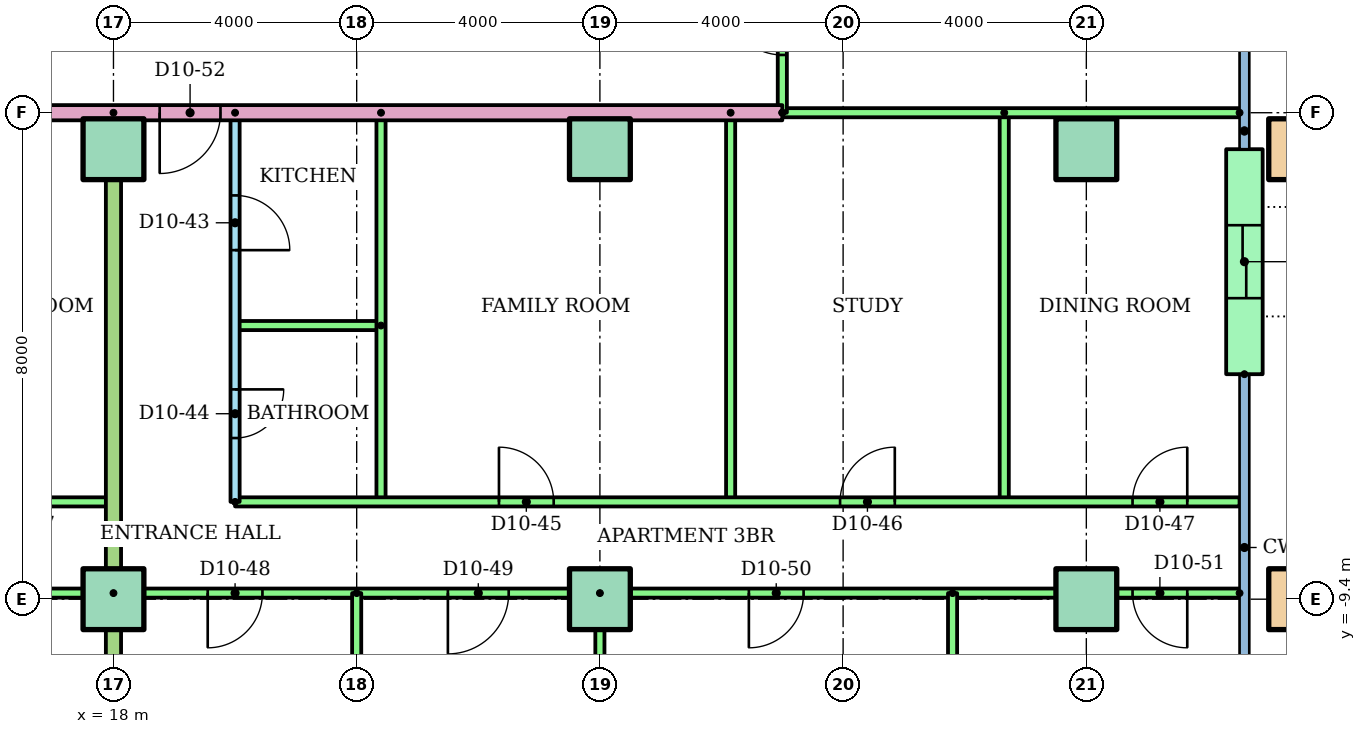
"""IFC4 building model, lengths in metres.
Left out: names, types, materials, properties, quantities, classifications, styles, units other than length and angle.
Written with IfcOpenShell. Run it as: python <this file> out.ifc"""

import sys

from ifc_helpers import new_model, si_unit, direction, frame, frame_2d, origin, origin_2d, place, context, subcontext, project, spatial, rectangle, hollow_rectangle, extrude, element, fill, save


model = new_model("IFC4")
c1 = context("Model", 3, precision=1e-05, world=origin(), true_north=direction((0.0, 1.0)))
c2 = subcontext(c1, "Body", "Model", "MODEL_VIEW")
j1 = project(units=[si_unit("LENGTHUNIT", "METRE"), si_unit("PLANEANGLEUNIT", "RADIAN")], contexts=[c1])
p1 = place(None, origin())
s1 = spatial("IfcSite", under=j1, at=p1, CompositionType="ELEMENT")
p2 = place(p1, origin())
s2 = spatial("IfcBuilding", under=s1, at=p2, CompositionType="ELEMENT")
p3 = place(p2, frame((0.0, 0.0, 41.6)))
s3 = spatial("IfcBuildingStorey", under=s2, at=p3, CompositionType="ELEMENT", Elevation=41.6)
for number, where in (
    (1, (18.0, -9.4, 0.0)),
    (2, (26.0, -9.4, 0.0)),
    (3, (34.0, -9.4, 0.0)),
):
    element("IfcColumn", number, at=place(p3, frame(where)), inside=s3, PredefinedType="COLUMN", context=c2, shape_type="SweptSolid", body=[
        extrude(rectangle(XDim=1.0, YDim=1.0, at=origin_2d()), origin(), (0.0, 0.0, 1.0), 3.2),
    ])
p4 = place(p3, frame((37.5, -9.4, 0.0)))
e4 = element("IfcColumn", 4, at=p4, inside=s3, PredefinedType="COLUMN", context=c2, shape_type="SweptSolid", body=[
    extrude(hollow_rectangle(XDim=1.0, YDim=1.0, WallThickness=0.05, at=origin_2d()), origin(), (0.0, 0.0, 1.0), 3.2),
])
for number, where in (
    (5, (18.0, -2.0, 0.0)),
    (6, (26.0, -2.0, 0.0)),
    (7, (34.0, -2.0, 0.0)),
):
    element("IfcColumn", number, at=place(p3, frame(where)), inside=s3, PredefinedType="COLUMN", context=c2, shape_type="SweptSolid", body=[
        extrude(rectangle(XDim=1.0, YDim=1.0, at=origin_2d()), origin(), (0.0, 0.0, 1.0), 3.2),
    ])
p5 = place(p3, frame((37.5, -2.0, 0.0)))
e8 = element("IfcColumn", 8, at=p5, inside=s3, PredefinedType="COLUMN", context=c2, shape_type="SweptSolid", body=[
    extrude(hollow_rectangle(XDim=1.0, YDim=1.0, WallThickness=0.05, at=origin_2d()), origin(), (0.0, 0.0, 1.0), 3.2),
])
p6 = place(p3, frame((36.6, -5.7, 0.0), z_axis=(0.0, 0.0, 1.0), x_axis=(0.0, 1.0, 0.0)))
e9 = element("IfcWall", 9, at=p6, inside=s3, PredefinedType="STANDARD", context=c2, shape_type="SweptSolid", body=[
    extrude(rectangle(XDim=3.7, YDim=0.6, at=frame_2d((1.85, 0.0))), origin(), (0.0, 0.0, 1.0), 2.92),
])
p7 = place(p6, frame((1.25, 0.0, 0.0)))
e10 = element("IfcOpeningElement", 10, at=p7, cuts=e9, PredefinedType="OPENING", context=c2, shape_type="SweptSolid", body=[
    extrude(rectangle(XDim=1.2, YDim=2.1, at=frame_2d((0.6, 1.05))), frame((0.0, 0.31, 0.0), z_axis=(0.0, -1.0, 0.0), x_axis=(1.0, 0.0, 0.0)), (0.0, 0.0, 1.0), 0.62),
])
p8 = place(p3, frame((4.0, -7.8, 0.0)))
e11 = element("IfcWall", 11, at=p8, inside=s3, PredefinedType="PARTITIONING", context=c2, shape_type="SweptSolid", body=[
    extrude(rectangle(XDim=14.0, YDim=0.15, at=frame_2d((7.0, 0.0))), origin(), (0.0, 0.0, 1.0), 2.4),
])
p9 = place(p8, frame((4.325, 0.0, 0.0)))
e12 = element("IfcOpeningElement", 12, at=p9, cuts=e11, PredefinedType="OPENING", context=c2, shape_type="SweptSolid", body=[
    extrude(rectangle(XDim=0.9, YDim=2.1, at=frame_2d((0.45, 1.05))), frame((0.0, 0.085, 0.0), z_axis=(0.0, -1.0, 0.0), x_axis=(1.0, 0.0, 0.0)), (0.0, 0.0, 1.0), 0.17),
])
p10 = place(p8, frame((8.575, 0.0, 0.0)))
e13 = element("IfcOpeningElement", 13, at=p10, cuts=e11, PredefinedType="OPENING", context=c2, shape_type="SweptSolid", body=[
    extrude(rectangle(XDim=0.9, YDim=2.1, at=frame_2d((0.45, 1.05))), frame((0.0, 0.085, 0.0), z_axis=(0.0, -1.0, 0.0), x_axis=(1.0, 0.0, 0.0)), (0.0, 0.0, 1.0), 0.17),
])
p11 = place(p8, frame((12.0, 0.0, 0.0)))
e14 = element("IfcOpeningElement", 14, at=p11, cuts=e11, PredefinedType="OPENING", context=c2, shape_type="SweptSolid", body=[
    extrude(rectangle(XDim=0.9, YDim=2.1, at=frame_2d((0.45, 1.05))), frame((0.0, 0.085, 0.0), z_axis=(0.0, -1.0, 0.0), x_axis=(1.0, 0.0, 0.0)), (0.0, 0.0, 1.0), 0.17),
])
p12 = place(p3, frame((18.0, -9.3, 0.0), z_axis=(0.0, 0.0, 1.0), x_axis=(-1.0, 0.0, 0.0)))
e15 = element("IfcWall", 15, at=p12, inside=s3, PredefinedType="PARTITIONING", context=c2, shape_type="SweptSolid", body=[
    extrude(rectangle(XDim=16.0, YDim=0.15, at=frame_2d((8.0, 0.0))), origin(), (0.0, 0.0, 1.0), 2.4),
])
p13 = place(p12, frame((13.55, 0.0, 0.0)))
e16 = element("IfcOpeningElement", 16, at=p13, cuts=e15, PredefinedType="OPENING", context=c2, shape_type="SweptSolid", body=[
    extrude(rectangle(XDim=0.9, YDim=2.1, at=frame_2d((0.45, 1.05))), frame((0.0, 0.085, 0.0), z_axis=(0.0, -1.0, 0.0), x_axis=(1.0, 0.0, 0.0)), (0.0, 0.0, 1.0), 0.17),
])
p14 = place(p12, frame((9.55, 0.0, 0.0)))
e17 = element("IfcOpeningElement", 17, at=p14, cuts=e15, PredefinedType="OPENING", context=c2, shape_type="SweptSolid", body=[
    extrude(rectangle(XDim=0.9, YDim=2.1, at=frame_2d((0.45, 1.05))), frame((0.0, 0.085, 0.0), z_axis=(0.0, -1.0, 0.0), x_axis=(1.0, 0.0, 0.0)), (0.0, 0.0, 1.0), 0.17),
])
p15 = place(p12, frame((5.55, 0.0, 0.0)))
e18 = element("IfcOpeningElement", 18, at=p15, cuts=e15, PredefinedType="OPENING", context=c2, shape_type="SweptSolid", body=[
    extrude(rectangle(XDim=0.9, YDim=2.1, at=frame_2d((0.45, 1.05))), frame((0.0, 0.085, 0.0), z_axis=(0.0, -1.0, 0.0), x_axis=(1.0, 0.0, 0.0)), (0.0, 0.0, 1.0), 0.17),
])
p16 = place(p12, frame((1.5, 0.0, 0.0)))
e19 = element("IfcOpeningElement", 19, at=p16, cuts=e15, PredefinedType="OPENING", context=c2, shape_type="SweptSolid", body=[
    extrude(rectangle(XDim=1.0, YDim=2.1, at=frame_2d((0.5, 1.05))), frame((0.0, 0.085, 0.0), z_axis=(0.0, -1.0, 0.0), x_axis=(1.0, 0.0, 0.0)), (0.0, 0.0, 1.0), 0.17),
])
p17 = place(p3, frame((20.0, -1.4, 0.0), z_axis=(0.0, 0.0, 1.0), x_axis=(0.0, -1.0, 0.0)))
e20 = element("IfcWall", 20, at=p17, inside=s3, PredefinedType="PARTITIONING", context=c2, shape_type="SweptSolid", body=[
    extrude(rectangle(XDim=6.4, YDim=0.15, at=frame_2d((3.2, 0.0))), origin(), (0.0, 0.0, 1.0), 2.4),
])
p18 = place(p17, frame((1.36, 0.0, 0.0)))
e21 = element("IfcOpeningElement", 21, at=p18, cuts=e20, PredefinedType="OPENING", context=c2, shape_type="SweptSolid", body=[
    extrude(rectangle(XDim=0.9, YDim=2.1, at=frame_2d((0.45, 1.05))), frame((0.0, 0.085, 0.0), z_axis=(0.0, -1.0, 0.0), x_axis=(1.0, 0.0, 0.0)), (0.0, 0.0, 1.0), 0.17),
])
p19 = place(p17, frame((4.55, 0.0, 0.0)))
e22 = element("IfcOpeningElement", 22, at=p19, cuts=e20, PredefinedType="OPENING", context=c2, shape_type="SweptSolid", body=[
    extrude(rectangle(XDim=0.8, YDim=2.1, at=frame_2d((0.4, 1.05))), frame((0.0, 0.085, 0.0), z_axis=(0.0, -1.0, 0.0), x_axis=(1.0, 0.0, 0.0)), (0.0, 0.0, 1.0), 0.17),
])
p20 = place(p3, frame((22.4, -4.9, 0.0), z_axis=(0.0, 0.0, 1.0), x_axis=(-1.0, 0.0, 0.0)))
e23 = element("IfcWall", 23, at=p20, inside=s3, PredefinedType="PARTITIONING", context=c2, shape_type="SweptSolid", body=[
    extrude(rectangle(XDim=2.4, YDim=0.15, at=frame_2d((1.2, 0.0))), origin(), (0.0, 0.0, 1.0), 2.4),
])
for number, where, z_axis, x_axis in (
    (24, (22.4, -1.4, 0.0), (0.0, 0.0, 1.0), (0.0, -1.0, 0.0)),
    (25, (28.15, -1.4, 0.0), (0.0, 0.0, 1.0), (0.0, -1.0, 0.0)),
    (26, (32.65, -1.4, 0.0), (0.0, 0.0, 1.0), (0.0, -1.0, 0.0)),
):
    element("IfcWall", number, at=place(p3, frame(where, z_axis=z_axis, x_axis=x_axis)), inside=s3, PredefinedType="PARTITIONING", context=c2, shape_type="SweptSolid", body=[
        extrude(rectangle(XDim=6.4, YDim=0.15, at=frame_2d((3.2, 0.0))), origin(), (0.0, 0.0, 1.0), 2.4),
    ])
p21 = place(p3, frame((20.0, -7.8, 0.0)))
e27 = element("IfcWall", 27, at=p21, inside=s3, PredefinedType="PARTITIONING", context=c2, shape_type="SweptSolid", body=[
    extrude(rectangle(XDim=16.52, YDim=0.15, at=frame_2d((8.26, 0.0))), origin(), (0.0, 0.0, 1.0), 2.4),
])
p22 = place(p21, frame((4.34, 0.0, 0.0)))
e28 = element("IfcOpeningElement", 28, at=p22, cuts=e27, PredefinedType="OPENING", context=c2, shape_type="SweptSolid", body=[
    extrude(rectangle(XDim=0.9, YDim=2.1, at=frame_2d((0.45, 1.05))), frame((0.0, 0.085, 0.0), z_axis=(0.0, -1.0, 0.0), x_axis=(1.0, 0.0, 0.0)), (0.0, 0.0, 1.0), 0.17),
])
p23 = place(p21, frame((9.95, 0.0, 0.0)))
e29 = element("IfcOpeningElement", 29, at=p23, cuts=e27, PredefinedType="OPENING", context=c2, shape_type="SweptSolid", body=[
    extrude(rectangle(XDim=0.9, YDim=2.1, at=frame_2d((0.45, 1.05))), frame((0.0, 0.085, 0.0), z_axis=(0.0, -1.0, 0.0), x_axis=(1.0, 0.0, 0.0)), (0.0, 0.0, 1.0), 0.17),
])
p24 = place(p21, frame((14.76, 0.0, 0.0)))
e30 = element("IfcOpeningElement", 30, at=p24, cuts=e27, PredefinedType="OPENING", context=c2, shape_type="SweptSolid", body=[
    extrude(rectangle(XDim=0.9, YDim=2.1, at=frame_2d((0.45, 1.05))), frame((0.0, 0.085, 0.0), z_axis=(0.0, -1.0, 0.0), x_axis=(1.0, 0.0, 0.0)), (0.0, 0.0, 1.0), 0.17),
])
p25 = place(p3, frame((36.52, -9.3, 0.0), z_axis=(0.0, 0.0, 1.0), x_axis=(-1.0, 0.0, 0.0)))
e31 = element("IfcWall", 31, at=p25, inside=s3, PredefinedType="PARTITIONING", context=c2, shape_type="SweptSolid", body=[
    extrude(rectangle(XDim=18.52, YDim=0.15, at=frame_2d((9.26, 0.0))), origin(), (0.0, 0.0, 1.0), 2.4),
])
p26 = place(p25, frame((16.07, 0.0, 0.0)))
e32 = element("IfcOpeningElement", 32, at=p26, cuts=e31, PredefinedType="OPENING", context=c2, shape_type="SweptSolid", body=[
    extrude(rectangle(XDim=0.9, YDim=2.1, at=frame_2d((0.45, 1.05))), frame((0.0, 0.085, 0.0), z_axis=(0.0, -1.0, 0.0), x_axis=(1.0, 0.0, 0.0)), (0.0, 0.0, 1.0), 0.17),
])
p27 = place(p25, frame((12.02, 0.0, 0.0)))
e33 = element("IfcOpeningElement", 33, at=p27, cuts=e31, PredefinedType="OPENING", context=c2, shape_type="SweptSolid", body=[
    extrude(rectangle(XDim=1.0, YDim=2.1, at=frame_2d((0.5, 1.05))), frame((0.0, 0.085, 0.0), z_axis=(0.0, -1.0, 0.0), x_axis=(1.0, 0.0, 0.0)), (0.0, 0.0, 1.0), 0.17),
])
p28 = place(p25, frame((7.17, 0.0, 0.0)))
e34 = element("IfcOpeningElement", 34, at=p28, cuts=e31, PredefinedType="OPENING", context=c2, shape_type="SweptSolid", body=[
    extrude(rectangle(XDim=0.9, YDim=2.1, at=frame_2d((0.45, 1.05))), frame((0.0, 0.085, 0.0), z_axis=(0.0, -1.0, 0.0), x_axis=(1.0, 0.0, 0.0)), (0.0, 0.0, 1.0), 0.17),
])
p29 = place(p25, frame((0.86, 0.0, 0.0)))
e35 = element("IfcOpeningElement", 35, at=p29, cuts=e31, PredefinedType="OPENING", context=c2, shape_type="SweptSolid", body=[
    extrude(rectangle(XDim=0.9, YDim=2.1, at=frame_2d((0.45, 1.05))), frame((0.0, 0.085, 0.0), z_axis=(0.0, -1.0, 0.0), x_axis=(1.0, 0.0, 0.0)), (0.0, 0.0, 1.0), 0.17),
])
p30 = place(p3, frame((22.0, -9.3, 0.0), z_axis=(0.0, 0.0, 1.0), x_axis=(0.0, -1.0, 0.0)))
e36 = element("IfcWall", 36, at=p30, inside=s3, PredefinedType="PARTITIONING", context=c2, shape_type="SweptSolid", body=[
    extrude(rectangle(XDim=6.821, YDim=0.15, at=frame_2d((3.411, 0.0))), origin(), (0.0, 0.0, 1.0), 2.4),
])
p31 = place(p3, frame((26.0, -9.3, 0.0), z_axis=(0.0, 0.0, 1.0), x_axis=(0.0, -1.0, 0.0)))
e37 = element("IfcWall", 37, at=p31, inside=s3, PredefinedType="PARTITIONING", context=c2, shape_type="SweptSolid", body=[
    extrude(rectangle(XDim=6.81, YDim=0.15, at=frame_2d((3.405, 0.0))), origin(), (0.0, 0.0, 1.0), 2.4),
])
p32 = place(p3, frame((31.8, -9.3, 0.0), z_axis=(0.0, 0.0, 1.0), x_axis=(0.0, -1.0, 0.0)))
e38 = element("IfcWall", 38, at=p32, inside=s3, PredefinedType="PARTITIONING", context=c2, shape_type="SweptSolid", body=[
    extrude(rectangle(XDim=5.02, YDim=0.15, at=frame_2d((2.51, 0.0))), origin(), (0.0, 0.0, 1.0), 2.4),
])
p33 = place(p3, frame((18.0, -1.4, 0.0), z_axis=(0.0, 0.0, 1.0), x_axis=(0.0, -1.0, 0.0)))
e39 = element("IfcWall", 39, at=p33, inside=s3, PredefinedType="PARTITIONING", context=c2, shape_type="SweptSolid", body=[
    extrude(rectangle(XDim=14.71, YDim=0.25, at=frame_2d((7.355, 0.0))), origin(), (0.0, 0.0, 1.0), 2.4),
])
p34 = place(p3, frame((29.0, -1.4, 0.0), z_axis=(0.0, 0.0, 1.0), x_axis=(-1.0, 0.0, 0.0)))
e40 = element("IfcWall", 40, at=p34, inside=s3, PredefinedType="PARTITIONING", context=c2, shape_type="SweptSolid", body=[
    extrude(rectangle(XDim=15.0, YDim=0.25, at=frame_2d((7.5, 0.0))), origin(), (0.0, 0.0, 1.0), 2.4),
])
p35 = place(p34, frame((9.24, 0.0, 0.0)))
e41 = element("IfcOpeningElement", 41, at=p35, cuts=e40, PredefinedType="OPENING", context=c2, shape_type="SweptSolid", body=[
    extrude(rectangle(XDim=1.0, YDim=2.1, at=frame_2d((0.5, 1.05))), frame((0.0, 0.135, 0.0), z_axis=(0.0, -1.0, 0.0), x_axis=(1.0, 0.0, 0.0)), (0.0, 0.0, 1.0), 0.27),
])
p36 = place(p3, frame((36.52, -1.4, 0.0), z_axis=(0.0, 0.0, 1.0), x_axis=(-1.0, 0.0, 0.0)))
e42 = element("IfcWall", 42, at=p36, inside=s3, PredefinedType="PARTITIONING", context=c2, shape_type="SweptSolid", body=[
    extrude(rectangle(XDim=7.52, YDim=0.15, at=frame_2d((3.76, 0.0))), origin(), (0.0, 0.0, 1.0), 2.4),
])
p37 = place(p3, frame((29.0, -1.4, 0.0), z_axis=(0.0, 0.0, 1.0), x_axis=(0.0, 1.0, 0.0)))
e43 = element("IfcWall", 43, at=p37, inside=s3, PredefinedType="PARTITIONING", context=c2, shape_type="SweptSolid", body=[
    extrude(rectangle(XDim=2.8, YDim=0.15, at=frame_2d((1.4, 0.0))), origin(), (0.0, 0.0, 1.0), 2.4),
])
p38 = place(p37, frame((0.95, 0.0, 0.0)))
e44 = element("IfcOpeningElement", 44, at=p38, cuts=e43, PredefinedType="OPENING", context=c2, shape_type="SweptSolid", body=[
    extrude(rectangle(XDim=0.9, YDim=2.1, at=frame_2d((0.45, 1.05))), frame((0.0, 0.085, 0.0), z_axis=(0.0, -1.0, 0.0), x_axis=(1.0, 0.0, 0.0)), (0.0, 0.0, 1.0), 0.17),
])
p39 = place(p18, origin())
e45 = element("IfcDoor", 45, at=p39, inside=s3, OperationType="SINGLE_SWING_RIGHT", PredefinedType="DOOR", context=c2, shape_type="SweptSolid", body=[
    extrude(rectangle(XDim=0.9, YDim=2.1, at=frame_2d((0.45, 1.05))), frame((0.0, 0.025, 0.0), z_axis=(0.0, -1.0, 0.0), x_axis=(1.0, 0.0, 0.0)), (0.0, 0.0, 1.0), 0.05),
])
fill(e21, e45)
p40 = place(p19, origin())
e46 = element("IfcDoor", 46, at=p40, inside=s3, OperationType="SINGLE_SWING_LEFT", PredefinedType="DOOR", context=c2, shape_type="SweptSolid", body=[
    extrude(rectangle(XDim=0.8, YDim=2.1, at=frame_2d((0.4, 1.05))), frame((0.0, 0.025, 0.0), z_axis=(0.0, -1.0, 0.0), x_axis=(1.0, 0.0, 0.0)), (0.0, 0.0, 1.0), 0.05),
])
fill(e22, e46)
p41 = place(p22, origin())
e47 = element("IfcDoor", 47, at=p41, inside=s3, OperationType="SINGLE_SWING_LEFT", PredefinedType="DOOR", context=c2, shape_type="SweptSolid", body=[
    extrude(rectangle(XDim=0.9, YDim=2.1, at=frame_2d((0.45, 1.05))), frame((0.0, 0.025, 0.0), z_axis=(0.0, -1.0, 0.0), x_axis=(1.0, 0.0, 0.0)), (0.0, 0.0, 1.0), 0.05),
])
fill(e28, e47)
p42 = place(p23, origin())
e48 = element("IfcDoor", 48, at=p42, inside=s3, OperationType="SINGLE_SWING_RIGHT", PredefinedType="DOOR", context=c2, shape_type="SweptSolid", body=[
    extrude(rectangle(XDim=0.9, YDim=2.1, at=frame_2d((0.45, 1.05))), frame((0.0, 0.025, 0.0), z_axis=(0.0, -1.0, 0.0), x_axis=(1.0, 0.0, 0.0)), (0.0, 0.0, 1.0), 0.05),
])
fill(e29, e48)
p43 = place(p24, origin())
e49 = element("IfcDoor", 49, at=p43, inside=s3, OperationType="SINGLE_SWING_RIGHT", PredefinedType="DOOR", context=c2, shape_type="SweptSolid", body=[
    extrude(rectangle(XDim=0.9, YDim=2.1, at=frame_2d((0.45, 1.05))), frame((0.0, 0.025, 0.0), z_axis=(0.0, -1.0, 0.0), x_axis=(1.0, 0.0, 0.0)), (0.0, 0.0, 1.0), 0.05),
])
fill(e30, e49)
p44 = place(p26, origin())
e50 = element("IfcDoor", 50, at=p44, inside=s3, OperationType="SINGLE_SWING_RIGHT", PredefinedType="DOOR", context=c2, shape_type="SweptSolid", body=[
    extrude(rectangle(XDim=0.9, YDim=2.1, at=frame_2d((0.45, 1.05))), frame((0.0, 0.025, 0.0), z_axis=(0.0, -1.0, 0.0), x_axis=(1.0, 0.0, 0.0)), (0.0, 0.0, 1.0), 0.05),
])
fill(e32, e50)
p45 = place(p27, origin())
e51 = element("IfcDoor", 51, at=p45, inside=s3, OperationType="SINGLE_SWING_RIGHT", PredefinedType="DOOR", context=c2, shape_type="SweptSolid", body=[
    extrude(rectangle(XDim=1.0, YDim=2.1, at=frame_2d((0.5, 1.05))), frame((0.0, 0.025, 0.0), z_axis=(0.0, -1.0, 0.0), x_axis=(1.0, 0.0, 0.0)), (0.0, 0.0, 1.0), 0.05),
])
fill(e33, e51)
p46 = place(p28, origin())
e52 = element("IfcDoor", 52, at=p46, inside=s3, OperationType="SINGLE_SWING_RIGHT", PredefinedType="DOOR", context=c2, shape_type="SweptSolid", body=[
    extrude(rectangle(XDim=0.9, YDim=2.1, at=frame_2d((0.45, 1.05))), frame((0.0, 0.025, 0.0), z_axis=(0.0, -1.0, 0.0), x_axis=(1.0, 0.0, 0.0)), (0.0, 0.0, 1.0), 0.05),
])
fill(e34, e52)
p47 = place(p29, origin())
e53 = element("IfcDoor", 53, at=p47, inside=s3, OperationType="SINGLE_SWING_LEFT", PredefinedType="DOOR", context=c2, shape_type="SweptSolid", body=[
    extrude(rectangle(XDim=0.9, YDim=2.1, at=frame_2d((0.45, 1.05))), frame((0.0, 0.025, 0.0), z_axis=(0.0, -1.0, 0.0), x_axis=(1.0, 0.0, 0.0)), (0.0, 0.0, 1.0), 0.05),
])
fill(e35, e53)
p48 = place(p35, origin())
e54 = element("IfcDoor", 54, at=p48, inside=s3, OperationType="SINGLE_SWING_RIGHT", PredefinedType="DOOR", context=c2, shape_type="SweptSolid", body=[
    extrude(rectangle(XDim=1.0, YDim=2.1, at=frame_2d((0.5, 1.05))), frame((0.0, 0.025, 0.0), z_axis=(0.0, -1.0, 0.0), x_axis=(1.0, 0.0, 0.0)), (0.0, 0.0, 1.0), 0.05),
])
fill(e41, e54)
p49 = place(p38, origin())
e55 = element("IfcDoor", 55, at=p49, inside=s3, OperationType="SINGLE_SWING_RIGHT", PredefinedType="DOOR", context=c2, shape_type="SweptSolid", body=[
    extrude(rectangle(XDim=0.9, YDim=2.1, at=frame_2d((0.45, 1.05))), frame((0.0, 0.025, 0.0), z_axis=(0.0, -1.0, 0.0), x_axis=(1.0, 0.0, 0.0)), (0.0, 0.0, 1.0), 0.05),
])
fill(e44, e55)
p50 = place(p7, origin())
e56 = element("IfcDoor", 56, at=p50, inside=s3, OperationType="SLIDING_TO_LEFT", PredefinedType="DOOR", context=c2, shape_type="SweptSolid", body=[
    extrude(rectangle(XDim=1.2, YDim=2.1, at=frame_2d((0.6, 1.05))), frame((0.0, 0.025, 0.0), z_axis=(0.0, -1.0, 0.0), x_axis=(1.0, 0.0, 0.0)), (0.0, 0.0, 1.0), 0.05),
])
fill(e10, e56)
save(model, sys.argv[1])
